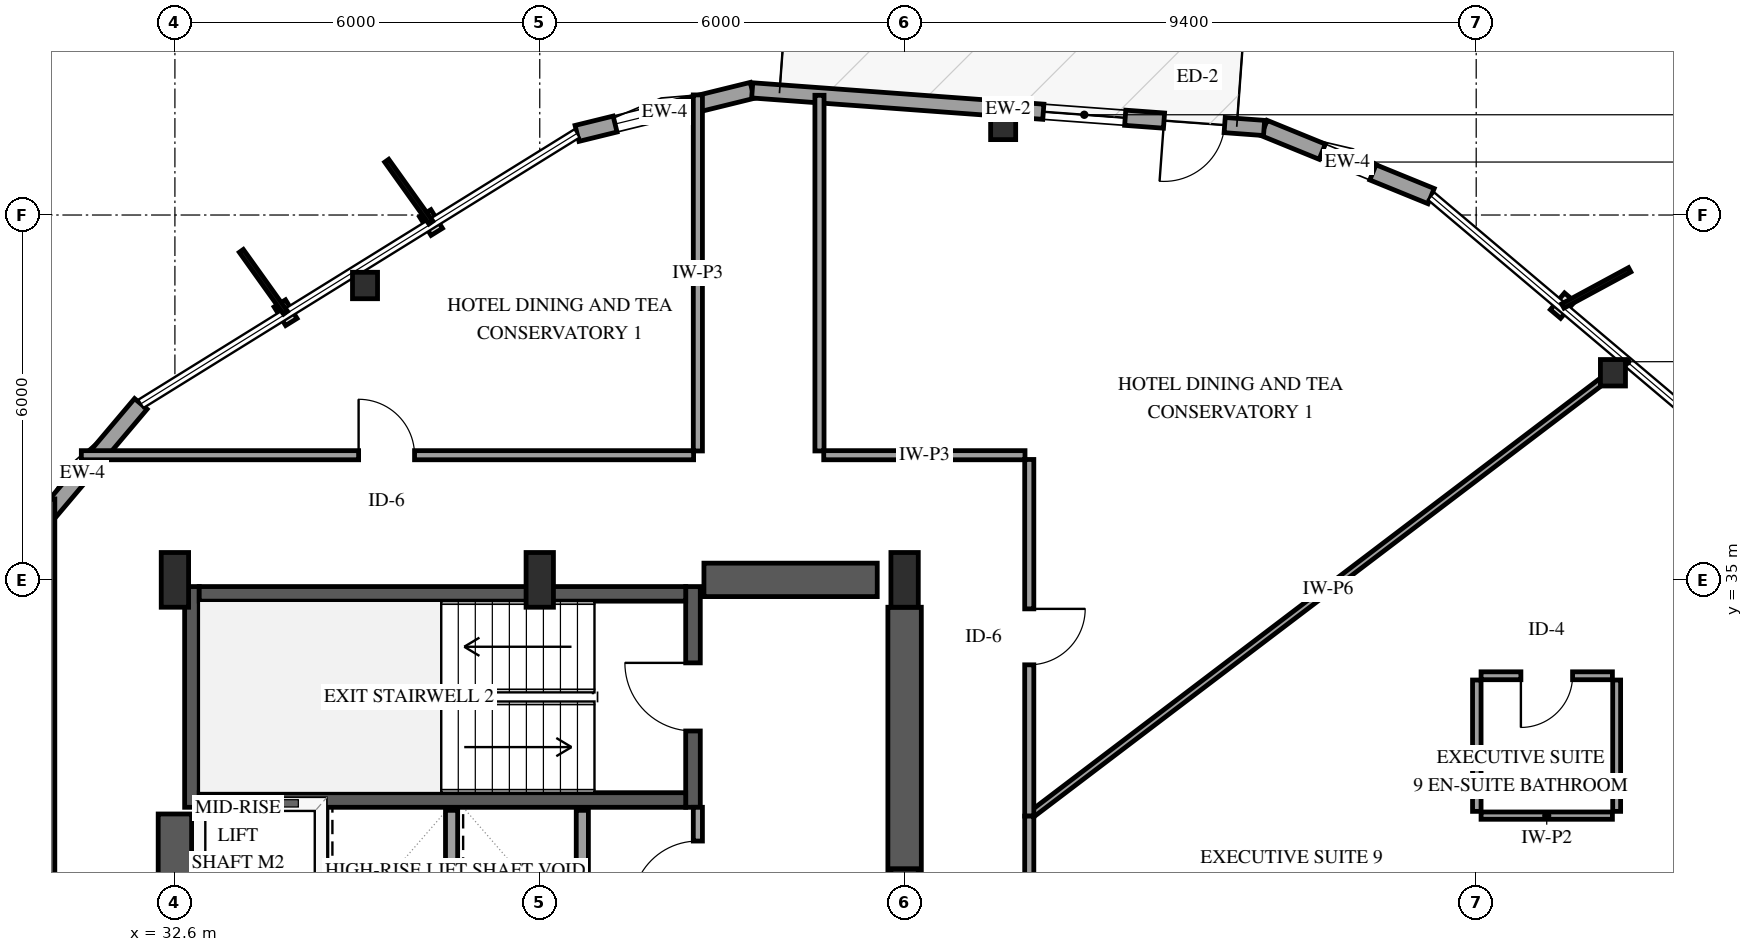
"""IFC4 building model, lengths in metres.
Left out: names, types, materials, properties, quantities, classifications, styles, units other than length and angle.
Written with IfcOpenShell. Run it as: python <this file> out.ifc"""

import sys

from ifc_helpers import new_model, si_unit, direction, frame, frame_2d, origin, origin_2d, place, context, subcontext, project, spatial, rectangle, i_section, extrude, element, fill, save


model = new_model("IFC4")
c1 = context("Model", 3, precision=1e-05, world=origin(), true_north=direction((0.0, 1.0)))
c2 = subcontext(c1, "Body", "Model", "MODEL_VIEW")
j1 = project(units=[si_unit("LENGTHUNIT", "METRE"), si_unit("PLANEANGLEUNIT", "RADIAN")], contexts=[c1])
p1 = place(None, origin())
s1 = spatial("IfcSite", under=j1, at=p1, CompositionType="ELEMENT")
p2 = place(p1, origin())
s2 = spatial("IfcBuilding", under=s1, at=p2, CompositionType="ELEMENT")
p3 = place(p2, frame((0.0, 0.0, 153.4)))
s3 = spatial("IfcBuildingStorey", under=s2, at=p3, CompositionType="ELEMENT", Elevation=153.4)
p4 = place(p3, frame((32.88, 31.26, 0.0), z_axis=(0.0, 0.0, 1.0), x_axis=(0.0, 1.0, 0.0)))
e1 = element("IfcWall", 1, at=p4, inside=s3, PredefinedType="SHEAR", context=c2, shape_type="SweptSolid", body=[
    extrude(rectangle(XDim=3.63, YDim=0.24, at=frame_2d((1.815, 0.0))), origin(), (0.0, 0.0, 1.0), 3.6),
])
p5 = place(p3, frame((41.12, 31.26, 0.0), z_axis=(0.0, 0.0, 1.0), x_axis=(0.0, 1.0, 0.0)))
e2 = element("IfcWall", 2, at=p5, inside=s3, PredefinedType="SHEAR", context=c2, shape_type="SweptSolid", body=[
    extrude(rectangle(XDim=3.63, YDim=0.24, at=frame_2d((1.815, 0.0))), origin(), (0.0, 0.0, 1.0), 3.6),
])
p6 = place(p5, frame((1.255, 0.0, 0.0)))
e3 = element("IfcOpeningElement", 3, at=p6, cuts=e2, PredefinedType="OPENING", context=c2, shape_type="SweptSolid", body=[
    extrude(rectangle(XDim=1.12, YDim=2.15, at=frame_2d((0.56, 1.075))), frame((0.0, 0.13, 0.0), z_axis=(0.0, -1.0, 0.0), x_axis=(1.0, 0.0, 0.0)), (0.0, 0.0, 1.0), 0.26),
])
for number, where, z_axis, x_axis in (
    (4, (33.0, 31.38, 0.0), (0.0, 0.0, 1.0), (1.0, 0.0, 0.0)),
    (5, (33.0, 34.77, 0.0), (0.0, 0.0, 1.0), (1.0, 0.0, 0.0)),
):
    element("IfcWall", number, at=place(p3, frame(where, z_axis=z_axis, x_axis=x_axis)), inside=s3, PredefinedType="SHEAR", context=c2, shape_type="SweptSolid", body=[
        extrude(rectangle(XDim=8.0, YDim=0.24, at=frame_2d((4.0, 0.0))), origin(), (0.0, 0.0, 1.0), 3.6),
    ])
p7 = place(p3, frame((32.6, 18.85, 0.0), z_axis=(0.0, 0.0, 1.0), x_axis=(0.0, 1.0, 0.0)))
e6 = element("IfcWall", 6, at=p7, inside=s3, PredefinedType="SHEAR", context=c2, shape_type="SweptSolid", body=[
    extrude(rectangle(XDim=12.3, YDim=0.55, at=frame_2d((6.15, 0.0))), origin(), (0.0, 0.0, 1.0), 3.6),
])
p8 = place(p3, frame((41.3, 35.0, 0.0), z_axis=(0.0, 0.0, 1.0), x_axis=(1.0, 0.0, 0.0)))
e7 = element("IfcWall", 7, at=p8, inside=s3, PredefinedType="SHEAR", context=c2, shape_type="SweptSolid", body=[
    extrude(rectangle(XDim=2.85, YDim=0.55, at=frame_2d((1.425, 0.0))), origin(), (0.0, 0.0, 1.0), 3.6),
])
p9 = place(p3, frame((44.6, 29.8, 0.0), z_axis=(0.0, 0.0, 1.0), x_axis=(0.0, 1.0, 0.0)))
e8 = element("IfcWall", 8, at=p9, inside=s3, PredefinedType="SHEAR", context=c2, shape_type="SweptSolid", body=[
    extrude(rectangle(XDim=4.75, YDim=0.55, at=frame_2d((2.375, 0.0))), origin(), (0.0, 0.0, 1.0), 3.6),
])
for number, where, z_axis, x_axis in (
    (9, (32.6, 35.0, 0.0), (0.0, 0.0, 1.0), (1.0, 0.0, 0.0)),
    (10, (38.6, 35.0, 0.0), (0.0, 0.0, 1.0), (1.0, 0.0, 0.0)),
    (11, (44.6, 29.8, 0.0), (0.0, 0.0, 1.0), (1.0, 0.0, 0.0)),
    (12, (44.6, 35.0, 0.0), (0.0, 0.0, 1.0), (1.0, 0.0, 0.0)),
):
    element("IfcColumn", number, at=place(p3, frame(where, z_axis=z_axis, x_axis=x_axis)), inside=s3, PredefinedType="PILASTER", context=c2, shape_type="SweptSolid", body=[
        extrude(rectangle(XDim=0.45, YDim=0.9, at=origin_2d()), origin(), (0.0, 0.0, 1.0), 3.6),
    ])
for number, where, z_axis, x_axis in (
    (13, (56.249, 38.406, 0.0), (0.0, 0.0, 1.0), (1.0, 0.0, 0.0)),
    (14, (46.221, 42.458, 0.0), (0.0, 0.0, 1.0), (1.0, 0.0, 0.0)),
    (15, (35.726, 39.841, 0.0), (0.0, 0.0, 1.0), (1.0, 0.0, 0.0)),
):
    element("IfcColumn", number, at=place(p3, frame(where, z_axis=z_axis, x_axis=x_axis)), inside=s3, PredefinedType="COLUMN", context=c2, shape_type="SweptSolid", body=[
        extrude(i_section(OverallWidth=0.412, OverallDepth=0.435, WebThickness=0.036, FlangeThickness=0.057, FilletRadius=0.038, at=origin_2d()), origin(), (0.0, 0.0, 1.0), 3.6),
    ])
p10 = place(p3, frame((53.258, 41.311, 0.0), z_axis=(0.0, 0.0, 1.0), x_axis=(-0.925871735267, 0.377837967699, 0.0)))
e16 = element("IfcWall", 16, at=p10, inside=s3, PredefinedType="SOLIDWALL", context=c2, shape_type="SweptSolid", body=[
    extrude(rectangle(XDim=2.967, YDim=0.27, at=frame_2d((1.483, 0.0))), origin(), (0.0, 0.0, 1.0), 2.679),
])
p11 = place(p10, frame((1.033, 0.0, 0.75)))
e17 = element("IfcOpeningElement", 17, at=p11, cuts=e16, PredefinedType="OPENING", context=c2, shape_type="SweptSolid", body=[
    extrude(rectangle(XDim=0.9, YDim=1.5, at=frame_2d((0.45, 0.75))), frame((0.0, 0.145, 0.0), z_axis=(0.0, -1.0, 0.0), x_axis=(1.0, 0.0, 0.0)), (0.0, 0.0, 1.0), 0.29),
])
p12 = place(p3, frame((42.094, 43.05, 0.0), z_axis=(0.0, 0.0, 1.0), x_axis=(-0.971145785541, -0.23848661016, 0.0)))
e18 = element("IfcWall", 18, at=p12, inside=s3, PredefinedType="SOLIDWALL", context=c2, shape_type="SweptSolid", body=[
    extrude(rectangle(XDim=2.967, YDim=0.27, at=frame_2d((1.483, 0.0))), origin(), (0.0, 0.0, 1.0), 2.679),
])
p13 = place(p12, frame((1.422, 0.0, 0.75)))
e19 = element("IfcOpeningElement", 19, at=p13, cuts=e18, PredefinedType="OPENING", context=c2, shape_type="SweptSolid", body=[
    extrude(rectangle(XDim=0.9, YDim=1.5, at=frame_2d((0.45, 0.75))), frame((0.0, 0.145, 0.0), z_axis=(0.0, -1.0, 0.0), x_axis=(1.0, 0.0, 0.0)), (0.0, 0.0, 1.0), 0.29),
])
p14 = place(p3, frame((50.512, 42.432, 0.0), z_axis=(0.0, 0.0, 1.0), x_axis=(-0.997314433886, 0.073238787279, 0.0)))
e20 = element("IfcWall", 20, at=p14, inside=s3, PredefinedType="SOLIDWALL", context=c2, shape_type="SweptSolid", body=[
    extrude(rectangle(XDim=8.44, YDim=0.25, at=frame_2d((4.22, 0.0))), origin(), (0.0, 0.0, 1.0), 2.679),
])
p15 = place(p14, frame((0.65, 0.0, 0.0)))
e21 = element("IfcOpeningElement", 21, at=p15, cuts=e20, PredefinedType="OPENING", context=c2, shape_type="SweptSolid", body=[
    extrude(rectangle(XDim=1.0, YDim=2.15, at=frame_2d((0.5, 1.075))), frame((0.0, 0.135, 0.0), z_axis=(0.0, -1.0, 0.0), x_axis=(1.0, 0.0, 0.0)), (0.0, 0.0, 1.0), 0.27),
])
p16 = place(p14, frame((2.29, 0.0, 0.72)))
e22 = element("IfcOpeningElement", 22, at=p16, cuts=e20, PredefinedType="OPENING", context=c2, shape_type="SweptSolid", body=[
    extrude(rectangle(XDim=1.35, YDim=1.65, at=frame_2d((0.675, 0.825))), frame((0.0, 0.135, 0.0), z_axis=(0.0, -1.0, 0.0), x_axis=(1.0, 0.0, 0.0)), (0.0, 0.0, 1.0), 0.27),
])
p17 = place(p3, frame((32.04, 37.894, 0.0), z_axis=(0.0, 0.0, 1.0), x_axis=(-0.645495712839, -0.763763893299, 0.0)))
e23 = element("IfcWall", 23, at=p17, inside=s3, PredefinedType="SOLIDWALL", context=c2, shape_type="SweptSolid", body=[
    extrude(rectangle(XDim=2.966, YDim=0.27, at=frame_2d((1.483, 0.0))), origin(), (0.0, 0.0, 1.0), 2.679),
])
for number, where, z_axis, x_axis in (
    (24, (35.0, 29.11, 0.0), (0.0, 0.0, 1.0), (0.0, 1.0, 0.0)),
    (25, (37.15, 29.11, 0.0), (0.0, 0.0, 1.0), (0.0, 1.0, 0.0)),
    (26, (39.3, 29.11, 0.0), (0.0, 0.0, 1.0), (0.0, 1.0, 0.0)),
):
    element("IfcWall", number, at=place(p3, frame(where, z_axis=z_axis, x_axis=x_axis)), inside=s3, PredefinedType="SOLIDWALL", context=c2, shape_type="SweptSolid", body=[
        extrude(rectangle(XDim=2.1, YDim=0.2, at=frame_2d((1.05, 0.0))), origin(), (0.0, 0.0, 1.0), 3.3),
    ])
p18 = place(p3, frame((46.65, 31.115, 0.0), z_axis=(0.0, 0.0, 1.0), x_axis=(0.796350735968, 0.604835105895, 0.0)))
e27 = element("IfcWall", 27, at=p18, inside=s3, PredefinedType="PARTITIONING", context=c2, shape_type="SweptSolid", body=[
    extrude(rectangle(XDim=12.349, YDim=0.11, at=frame_2d((6.174, 0.0))), origin(), (0.0, 0.0, 1.0), 3.3),
])
p19 = place(p3, frame((30.55, 26.077, 0.0), z_axis=(0.0, 0.0, 1.0), x_axis=(0.0, 1.0, 0.0)))
e28 = element("IfcWall", 28, at=p19, inside=s3, PredefinedType="PARTITIONING", context=c2, shape_type="SweptSolid", body=[
    extrude(rectangle(XDim=10.254, YDim=0.15, at=frame_2d((5.127, 0.0))), origin(), (0.0, 0.0, 1.0), 3.3),
])
p20 = place(p19, frame((1.063, 0.0, 0.0)))
e29 = element("IfcOpeningElement", 29, at=p20, cuts=e28, PredefinedType="OPENING", context=c2, shape_type="SweptSolid", body=[
    extrude(rectangle(XDim=0.92, YDim=2.12, at=frame_2d((0.46, 1.06))), frame((0.0, 0.085, 0.0), z_axis=(0.0, -1.0, 0.0), x_axis=(1.0, 0.0, 0.0)), (0.0, 0.0, 1.0), 0.17),
])
p21 = place(p3, frame((31.061, 37.05, 0.0), z_axis=(0.0, 0.0, 1.0), x_axis=(1.0, 0.0, 0.0)))
e30 = element("IfcWall", 30, at=p21, inside=s3, PredefinedType="PARTITIONING", context=c2, shape_type="SweptSolid", body=[
    extrude(rectangle(XDim=10.069, YDim=0.15, at=frame_2d((5.034, 0.0))), origin(), (0.0, 0.0, 1.0), 3.3),
])
p22 = place(p21, frame((4.56, 0.0, 0.0)))
e31 = element("IfcOpeningElement", 31, at=p22, cuts=e30, PredefinedType="OPENING", context=c2, shape_type="SweptSolid", body=[
    extrude(rectangle(XDim=0.92, YDim=2.12, at=frame_2d((0.46, 1.06))), frame((0.0, 0.085, 0.0), z_axis=(0.0, -1.0, 0.0), x_axis=(1.0, 0.0, 0.0)), (0.0, 0.0, 1.0), 0.17),
])
p23 = place(p3, frame((46.65, 36.98, 0.0), z_axis=(0.0, 0.0, 1.0), x_axis=(0.0, -1.0, 0.0)))
e32 = element("IfcWall", 32, at=p23, inside=s3, PredefinedType="PARTITIONING", context=c2, shape_type="SweptSolid", body=[
    extrude(rectangle(XDim=5.865, YDim=0.15, at=frame_2d((2.933, 0.0))), origin(), (0.0, 0.0, 1.0), 3.3),
])
p24 = place(p23, frame((2.457, 0.0, 0.0)))
e33 = element("IfcOpeningElement", 33, at=p24, cuts=e32, PredefinedType="OPENING", context=c2, shape_type="SweptSolid", body=[
    extrude(rectangle(XDim=0.92, YDim=2.12, at=frame_2d((0.46, 1.06))), frame((0.0, 0.085, 0.0), z_axis=(0.0, -1.0, 0.0), x_axis=(1.0, 0.0, 0.0)), (0.0, 0.0, 1.0), 0.17),
])
p25 = place(p3, frame((41.2, 37.12, 0.0), z_axis=(0.0, 0.0, 1.0), x_axis=(0.0, 1.0, 0.0)))
e34 = element("IfcWall", 34, at=p25, inside=s3, PredefinedType="PARTITIONING", context=c2, shape_type="SweptSolid", body=[
    extrude(rectangle(XDim=5.855, YDim=0.15, at=frame_2d((2.927, 0.0))), origin(), (0.0, 0.0, 1.0), 3.3),
])
p26 = place(p3, frame((43.2, 42.969, 0.0), z_axis=(0.0, 0.0, 1.0), x_axis=(0.0, -1.0, 0.0)))
e35 = element("IfcWall", 35, at=p26, inside=s3, PredefinedType="PARTITIONING", context=c2, shape_type="SweptSolid", body=[
    extrude(rectangle(XDim=5.849, YDim=0.15, at=frame_2d((2.924, 0.0))), origin(), (0.0, 0.0, 1.0), 3.3),
])
p27 = place(p3, frame((46.65, 31.115, 0.0), z_axis=(0.0, 0.0, 1.0), x_axis=(0.0, -1.0, 0.0)))
e36 = element("IfcWall", 36, at=p27, inside=s3, PredefinedType="PARTITIONING", context=c2, shape_type="SweptSolid", body=[
    extrude(rectangle(XDim=4.657, YDim=0.15, at=frame_2d((2.329, 0.0))), origin(), (0.0, 0.0, 1.0), 3.3),
])
p28 = place(p27, frame((1.853, 0.0, 0.0)))
e37 = element("IfcOpeningElement", 37, at=p28, cuts=e36, PredefinedType="OPENING", context=c2, shape_type="SweptSolid", body=[
    extrude(rectangle(XDim=0.92, YDim=2.12, at=frame_2d((0.46, 1.06))), frame((0.0, 0.085, 0.0), z_axis=(0.0, -1.0, 0.0), x_axis=(1.0, 0.0, 0.0)), (0.0, 0.0, 1.0), 0.17),
])
p29 = place(p3, frame((43.27, 37.05, 0.0), z_axis=(0.0, 0.0, 1.0), x_axis=(1.0, 0.0, 0.0)))
e38 = element("IfcWall", 38, at=p29, inside=s3, PredefinedType="PARTITIONING", context=c2, shape_type="SweptSolid", body=[
    extrude(rectangle(XDim=3.31, YDim=0.15, at=frame_2d((1.655, 0.0))), origin(), (0.0, 0.0, 1.0), 3.3),
])
p30 = place(p3, frame((41.2, 29.07, 0.0), z_axis=(0.0, 0.0, 1.0), x_axis=(0.0, 1.0, 0.0)))
e39 = element("IfcWall", 39, at=p30, inside=s3, PredefinedType="PARTITIONING", context=c2, shape_type="SweptSolid", body=[
    extrude(rectangle(XDim=2.19, YDim=0.15, at=frame_2d((1.095, 0.0))), origin(), (0.0, 0.0, 1.0), 3.3),
])
p31 = place(p30, frame((0.555, 0.0, 0.0)))
e40 = element("IfcOpeningElement", 40, at=p31, cuts=e39, PredefinedType="OPENING", context=c2, shape_type="SweptSolid", body=[
    extrude(rectangle(XDim=1.08, YDim=2.15, at=frame_2d((0.54, 1.075))), frame((0.0, 0.085, 0.0), z_axis=(0.0, -1.0, 0.0), x_axis=(1.0, 0.0, 0.0)), (0.0, 0.0, 1.0), 0.17),
])
p32 = place(p3, frame((56.24, 33.423, 0.0), z_axis=(0.0, 0.0, 1.0), x_axis=(-1.0, 0.0, 0.0)))
e41 = element("IfcWall", 41, at=p32, inside=s3, PredefinedType="PARTITIONING", context=c2, shape_type="SweptSolid", body=[
    extrude(rectangle(XDim=2.16, YDim=0.13, at=frame_2d((1.08, 0.0))), origin(), (0.0, 0.0, 1.0), 3.3),
])
p33 = place(p32, frame((0.655, 0.0, 0.0)))
e42 = element("IfcOpeningElement", 42, at=p33, cuts=e41, PredefinedType="OPENING", context=c2, shape_type="SweptSolid", body=[
    extrude(rectangle(XDim=0.85, YDim=2.1, at=frame_2d((0.425, 1.05))), frame((0.0, 0.075, 0.0), z_axis=(0.0, -1.0, 0.0), x_axis=(1.0, 0.0, 0.0)), (0.0, 0.0, 1.0), 0.15),
])
p34 = place(p3, frame((54.08, 31.123, 0.0), z_axis=(0.0, 0.0, 1.0), x_axis=(1.0, 0.0, 0.0)))
e43 = element("IfcWall", 43, at=p34, inside=s3, PredefinedType="PARTITIONING", context=c2, shape_type="SweptSolid", body=[
    extrude(rectangle(XDim=2.16, YDim=0.12, at=frame_2d((1.08, 0.0))), origin(), (0.0, 0.0, 1.0), 3.3),
])
p35 = place(p3, frame((54.01, 33.353, 0.0), z_axis=(0.0, 0.0, 1.0), x_axis=(0.0, -1.0, 0.0)))
e44 = element("IfcWall", 44, at=p35, inside=s3, PredefinedType="PARTITIONING", context=c2, shape_type="SweptSolid", body=[
    extrude(rectangle(XDim=2.16, YDim=0.14, at=frame_2d((1.08, 0.0))), origin(), (0.0, 0.0, 1.0), 3.3),
])
p36 = place(p3, frame((56.31, 31.193, 0.0), z_axis=(0.0, 0.0, 1.0), x_axis=(0.0, 1.0, 0.0)))
e45 = element("IfcWall", 45, at=p36, inside=s3, PredefinedType="PARTITIONING", context=c2, shape_type="SweptSolid", body=[
    extrude(rectangle(XDim=2.16, YDim=0.13, at=frame_2d((1.08, 0.0))), origin(), (0.0, 0.0, 1.0), 3.3),
])
p37 = place(p11, origin())
e46 = element("IfcWindow", 46, at=p37, inside=s3, PartitioningType="SINGLE_PANEL", PredefinedType="WINDOW", context=c2, shape_type="SweptSolid", body=[
    extrude(rectangle(XDim=0.9, YDim=1.5, at=frame_2d((0.45, 0.75))), frame((0.0, 0.03, 0.0), z_axis=(0.0, -1.0, 0.0), x_axis=(1.0, 0.0, 0.0)), (0.0, 0.0, 1.0), 0.06),
])
fill(e17, e46)
p38 = place(p13, origin())
e47 = element("IfcWindow", 47, at=p38, inside=s3, PartitioningType="SINGLE_PANEL", PredefinedType="WINDOW", context=c2, shape_type="SweptSolid", body=[
    extrude(rectangle(XDim=0.9, YDim=1.5, at=frame_2d((0.45, 0.75))), frame((0.0, 0.03, 0.0), z_axis=(0.0, -1.0, 0.0), x_axis=(1.0, 0.0, 0.0)), (0.0, 0.0, 1.0), 0.06),
])
fill(e19, e47)
p39 = place(p15, origin())
e48 = element("IfcDoor", 48, at=p39, inside=s3, OperationType="SINGLE_SWING_RIGHT", PredefinedType="DOOR", context=c2, shape_type="SweptSolid", body=[
    extrude(rectangle(XDim=1.0, YDim=2.15, at=frame_2d((0.5, 1.075))), frame((0.0, 0.025, 0.0), z_axis=(0.0, -1.0, 0.0), x_axis=(1.0, 0.0, 0.0)), (0.0, 0.0, 1.0), 0.05),
])
fill(e21, e48)
p40 = place(p16, origin())
e49 = element("IfcWindow", 49, at=p40, inside=s3, PartitioningType="SINGLE_PANEL", PredefinedType="WINDOW", context=c2, shape_type="SweptSolid", body=[
    extrude(rectangle(XDim=1.35, YDim=1.65, at=frame_2d((0.675, 0.825))), frame((0.0, 0.03, 0.0), z_axis=(0.0, -1.0, 0.0), x_axis=(1.0, 0.0, 0.0)), (0.0, 0.0, 1.0), 0.06),
])
fill(e22, e49)
p41 = place(p6, origin())
e50 = element("IfcDoor", 50, at=p41, inside=s3, OperationType="SINGLE_SWING_RIGHT", PredefinedType="DOOR", context=c2, shape_type="SweptSolid", body=[
    extrude(rectangle(XDim=1.12, YDim=2.15, at=frame_2d((0.56, 1.075))), frame((0.0, 0.025, 0.0), z_axis=(0.0, -1.0, 0.0), x_axis=(1.0, 0.0, 0.0)), (0.0, 0.0, 1.0), 0.05),
])
fill(e3, e50)
p42 = place(p22, origin())
e51 = element("IfcDoor", 51, at=p42, inside=s3, OperationType="SINGLE_SWING_LEFT", PredefinedType="DOOR", context=c2, shape_type="SweptSolid", body=[
    extrude(rectangle(XDim=0.92, YDim=2.12, at=frame_2d((0.46, 1.06))), frame((0.0, 0.025, 0.0), z_axis=(0.0, -1.0, 0.0), x_axis=(1.0, 0.0, 0.0)), (0.0, 0.0, 1.0), 0.05),
])
fill(e31, e51)
p43 = place(p24, origin())
e52 = element("IfcDoor", 52, at=p43, inside=s3, OperationType="SINGLE_SWING_LEFT", PredefinedType="DOOR", context=c2, shape_type="SweptSolid", body=[
    extrude(rectangle(XDim=0.92, YDim=2.12, at=frame_2d((0.46, 1.06))), frame((0.0, 0.025, 0.0), z_axis=(0.0, -1.0, 0.0), x_axis=(1.0, 0.0, 0.0)), (0.0, 0.0, 1.0), 0.05),
])
fill(e33, e52)
p44 = place(p31, origin())
e53 = element("IfcDoor", 53, at=p44, inside=s3, OperationType="SINGLE_SWING_LEFT", PredefinedType="DOOR", context=c2, shape_type="SweptSolid", body=[
    extrude(rectangle(XDim=1.08, YDim=2.15, at=frame_2d((0.54, 1.075))), frame((0.0, 0.025, 0.0), z_axis=(0.0, -1.0, 0.0), x_axis=(1.0, 0.0, 0.0)), (0.0, 0.0, 1.0), 0.05),
])
fill(e40, e53)
p45 = place(p33, origin())
e54 = element("IfcDoor", 54, at=p45, inside=s3, OperationType="SINGLE_SWING_RIGHT", PredefinedType="DOOR", context=c2, shape_type="SweptSolid", body=[
    extrude(rectangle(XDim=0.85, YDim=2.1, at=frame_2d((0.425, 1.05))), frame((0.0, 0.025, 0.0), z_axis=(0.0, -1.0, 0.0), x_axis=(1.0, 0.0, 0.0)), (0.0, 0.0, 1.0), 0.05),
])
fill(e42, e54)
save(model, sys.argv[1])
